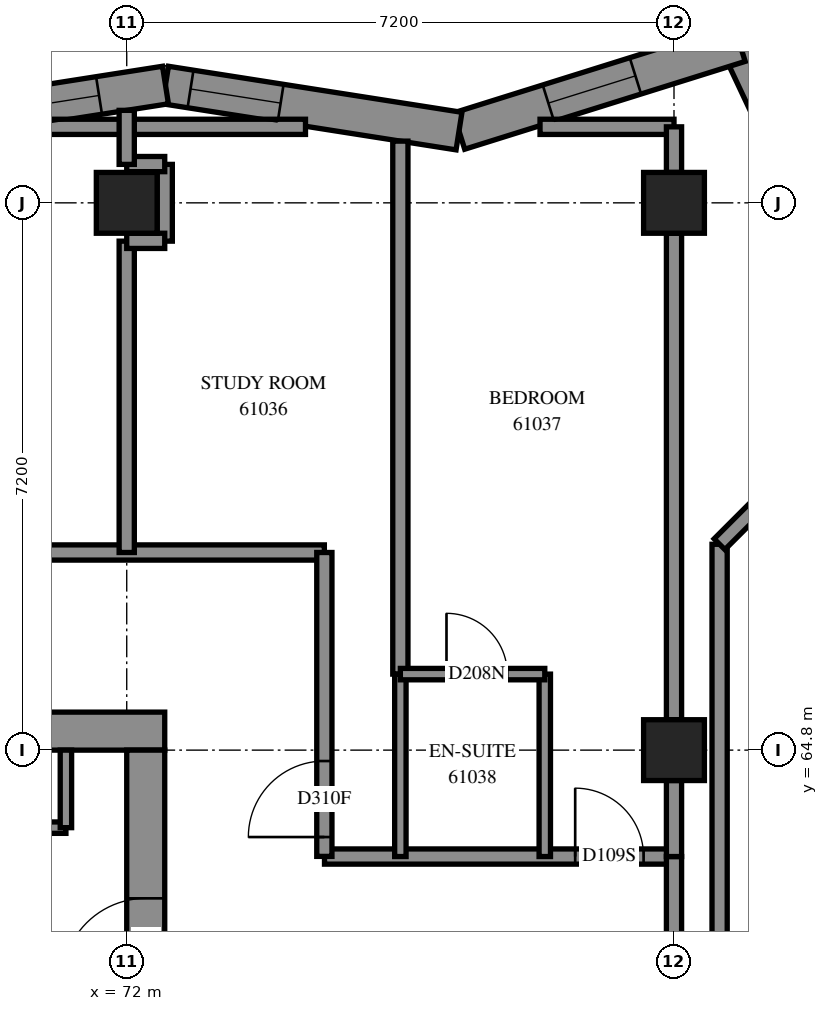
"""IFC4 building model, lengths in metres.
Left out: names, types, materials, properties, quantities, classifications, styles, units other than length and angle.
Written with IfcOpenShell. Run it as: python <this file> out.ifc"""

import sys

from ifc_helpers import new_model, si_unit, direction, frame, frame_2d, origin, origin_2d, place, context, subcontext, project, spatial, polyline, rectangle, outline, extrude, element, fill, save


model = new_model("IFC4")
c1 = context("Model", 3, precision=1e-05, world=origin(), true_north=direction((0.0, 1.0)))
c2 = subcontext(c1, "Body", "Model", "MODEL_VIEW")
j1 = project(units=[si_unit("LENGTHUNIT", "METRE"), si_unit("PLANEANGLEUNIT", "RADIAN")], contexts=[c1])
p1 = place(None, origin())
s1 = spatial("IfcSite", under=j1, at=p1, CompositionType="ELEMENT")
p2 = place(p1, origin())
s2 = spatial("IfcBuilding", under=s1, at=p2, CompositionType="ELEMENT")
p3 = place(p2, frame((0.0, 0.0, 223.6)))
s3 = spatial("IfcBuildingStorey", under=s2, at=p3, CompositionType="ELEMENT", Elevation=223.6)
for number, where, z_axis, x_axis in (
    (1, (72.0, 72.0, 0.0), (0.0, 0.0, 1.0), (1.0, 0.0, 0.0)),
    (2, (79.2, 64.8, 0.0), (0.0, 0.0, 1.0), (1.0, 0.0, 0.0)),
    (3, (79.2, 72.0, 0.0), (0.0, 0.0, 1.0), (1.0, 0.0, 0.0)),
):
    element("IfcColumn", number, at=place(p3, frame(where, z_axis=z_axis, x_axis=x_axis)), inside=s3, PredefinedType="COLUMN", context=c2, shape_type="SweptSolid", body=[
        extrude(rectangle(XDim=0.8, YDim=0.8, at=origin_2d()), origin(), (0.0, 0.0, 1.0), 3.1),
    ])
p4 = place(p3, frame((57.1, 65.05, -0.3), z_axis=(0.0, 0.0, 1.0), x_axis=(1.0, 0.0, 0.0)))
e4 = element("IfcWall", 4, at=p4, inside=s3, PredefinedType="SHEAR", context=c2, shape_type="SweptSolid", body=[
    extrude(rectangle(XDim=15.4, YDim=0.5, at=frame_2d((7.7, 0.0))), origin(), (0.0, 0.0, 1.0), 2.7),
])
p5 = place(p4, frame((10.5, 0.0, 0.3)))
e5 = element("IfcOpeningElement", 5, at=p5, cuts=e4, PredefinedType="OPENING", context=c2, shape_type="SweptSolid", body=[
    extrude(rectangle(XDim=0.8, YDim=2.1, at=frame_2d((0.4, 1.05))), frame((0.0, 0.26, 0.0), z_axis=(0.0, -1.0, 0.0), x_axis=(1.0, 0.0, 0.0)), (0.0, 0.0, 1.0), 0.52),
])
p6 = place(p3, frame((72.25, 50.4, -0.3), z_axis=(0.0, 0.0, 1.0), x_axis=(0.0, 1.0, 0.0)))
e6 = element("IfcWall", 6, at=p6, inside=s3, PredefinedType="SHEAR", context=c2, shape_type="SweptSolid", body=[
    extrude(rectangle(XDim=14.4, YDim=0.5, at=frame_2d((7.2, 0.0))), origin(), (0.0, 0.0, 1.0), 2.7),
])
p7 = place(p6, frame((4.55, 0.0, 0.3)))
e7 = element("IfcOpeningElement", 7, at=p7, cuts=e6, PredefinedType="OPENING", context=c2, shape_type="SweptSolid", body=[
    extrude(rectangle(XDim=1.1, YDim=2.1, at=frame_2d((0.55, 1.05))), frame((0.0, 0.26, 0.0), z_axis=(0.0, -1.0, 0.0), x_axis=(1.0, 0.0, 0.0)), (0.0, 0.0, 1.0), 0.52),
])
p8 = place(p6, frame((11.35, 0.0, 0.3)))
e8 = element("IfcOpeningElement", 8, at=p8, cuts=e6, PredefinedType="OPENING", context=c2, shape_type="SweptSolid", body=[
    extrude(rectangle(XDim=1.1, YDim=2.1, at=frame_2d((0.55, 1.05))), frame((0.0, 0.26, 0.0), z_axis=(0.0, -1.0, 0.0), x_axis=(1.0, 0.0, 0.0)), (0.0, 0.0, 1.0), 0.52),
])
p9 = place(p3, frame((81.508, 71.024, 0.0), z_axis=(0.0, 0.0, 1.0), x_axis=(-0.4256057347, 0.9049087018, 0.0)))
e9 = element("IfcWall", 9, at=p9, inside=s3, PredefinedType="SOLIDWALL", context=c2, shape_type="SweptSolid", body=[
    extrude(outline(polyline([(0.067, -0.25), (3.617, -0.25), (3.181, 0.25), (-0.067, 0.25), (0.067, -0.25)])), origin(), (0.0, 0.0, 1.0), 3.1),
])
p10 = place(p9, frame((0.734, 0.0, 0.45)))
e10 = element("IfcOpeningElement", 10, at=p10, cuts=e9, PredefinedType="OPENING", context=c2, shape_type="SweptSolid", body=[
    extrude(rectangle(XDim=1.2, YDim=2.5, at=frame_2d((0.6, 1.25))), frame((0.0, 0.26, 0.0), z_axis=(0.0, -1.0, 0.0), x_axis=(1.0, 0.0, 0.0)), (0.0, 0.0, 1.0), 0.52),
])
p11 = place(p3, frame((80.062, 74.099, 0.0), z_axis=(0.0, 0.0, 1.0), x_axis=(-0.9543289305, -0.2987579161, 0.0)))
e11 = element("IfcWall", 11, at=p11, inside=s3, PredefinedType="SOLIDWALL", context=c2, shape_type="SweptSolid", body=[
    extrude(outline(polyline([(-0.218, -0.25), (3.809, -0.25), (3.925, 0.25), (0.218, 0.25), (-0.218, -0.25)])), origin(), (0.0, 0.0, 1.0), 3.1),
])
p12 = place(p11, frame((1.435, 0.0, 0.45)))
e12 = element("IfcOpeningElement", 12, at=p12, cuts=e11, PredefinedType="OPENING", context=c2, shape_type="SweptSolid", body=[
    extrude(rectangle(XDim=1.2, YDim=2.5, at=frame_2d((0.6, 1.25))), frame((0.0, 0.26, 0.0), z_axis=(0.0, -1.0, 0.0), x_axis=(1.0, 0.0, 0.0)), (0.0, 0.0, 1.0), 0.52),
])
p13 = place(p3, frame((76.372, 72.944, 0.0), z_axis=(0.0, 0.0, 1.0), x_axis=(-0.9879139197, 0.1550035072, 0.0)))
e13 = element("IfcWall", 13, at=p13, inside=s3, PredefinedType="SOLIDWALL", context=c2, shape_type="SweptSolid", body=[
    extrude(outline(polyline([(0.058, -0.25), (3.948, -0.25), (3.87, 0.25), (-0.058, 0.25), (0.058, -0.25)])), origin(), (0.0, 0.0, 1.0), 3.1),
])
p14 = place(p13, frame((2.375, 0.0, 0.45)))
e14 = element("IfcOpeningElement", 14, at=p14, cuts=e13, PredefinedType="OPENING", context=c2, shape_type="SweptSolid", body=[
    extrude(rectangle(XDim=1.2, YDim=2.5, at=frame_2d((0.6, 1.25))), frame((0.0, 0.26, 0.0), z_axis=(0.0, -1.0, 0.0), x_axis=(1.0, 0.0, 0.0)), (0.0, 0.0, 1.0), 0.52),
])
p15 = place(p3, frame((72.51, 73.55, 0.0), z_axis=(0.0, 0.0, 1.0), x_axis=(-0.9879107269, -0.1550238552, 0.0)))
e15 = element("IfcWall", 15, at=p15, inside=s3, PredefinedType="SOLIDWALL", context=c2, shape_type="SweptSolid", body=[
    extrude(outline(polyline([(-0.039, -0.25), (3.85, -0.25), (3.929, 0.25), (0.039, 0.25), (-0.039, -0.25)])), origin(), (0.0, 0.0, 1.0), 3.1),
])
p16 = place(p15, frame((2.203, 0.0, 0.45)))
e16 = element("IfcOpeningElement", 16, at=p16, cuts=e15, PredefinedType="OPENING", context=c2, shape_type="SweptSolid", body=[
    extrude(rectangle(XDim=1.3, YDim=2.5, at=frame_2d((0.65, 1.25))), frame((0.0, 0.26, 0.0), z_axis=(0.0, -1.0, 0.0), x_axis=(1.0, 0.0, 0.0)), (0.0, 0.0, 1.0), 0.52),
])
p17 = place(p15, frame((0.885, 0.0, 0.45)))
e17 = element("IfcOpeningElement", 17, at=p17, cuts=e15, PredefinedType="OPENING", context=c2, shape_type="SweptSolid", body=[
    extrude(rectangle(XDim=0.8, YDim=2.5, at=frame_2d((0.4, 1.25))), frame((0.0, 0.26, 0.0), z_axis=(0.0, -1.0, 0.0), x_axis=(1.0, 0.0, 0.0)), (0.0, 0.0, 1.0), 0.52),
])
p18 = place(p3, frame((64.95, 63.78, 0.0), z_axis=(0.0, 0.0, 1.0), x_axis=(1.0, 0.0, 0.0)))
e18 = element("IfcWall", 18, at=p18, inside=s3, PredefinedType="PARTITIONING", context=c2, shape_type="SweptSolid", body=[
    extrude(rectangle(XDim=6.25, YDim=0.15, at=frame_2d((3.125, 0.0))), origin(), (0.0, 0.0, 1.0), 3.1),
])
p19 = place(p3, frame((71.2, 63.78, 0.0), z_axis=(0.0, 0.0, 1.0), x_axis=(0.0, 1.0, 0.0)))
e19 = element("IfcWall", 19, at=p19, inside=s3, PredefinedType="PARTITIONING", context=c2, shape_type="SweptSolid", body=[
    extrude(rectangle(XDim=1.02, YDim=0.15, at=frame_2d((0.51, 0.0))), origin(), (0.0, 0.0, 1.0), 3.1),
])
p20 = place(p3, frame((55.0, 67.4, 0.0), z_axis=(0.0, 0.0, 1.0), x_axis=(1.0, 0.0, 0.0)))
e20 = element("IfcWall", 20, at=p20, inside=s3, PredefinedType="PARTITIONING", context=c2, shape_type="SweptSolid", body=[
    extrude(rectangle(XDim=19.6, YDim=0.2, at=frame_2d((9.8, 0.0))), origin(), (0.0, 0.0, 1.0), 3.1),
])
p21 = place(p20, frame((4.9, 0.0, 0.0)))
e21 = element("IfcOpeningElement", 21, at=p21, cuts=e20, PredefinedType="OPENING", context=c2, shape_type="SweptSolid", body=[
    extrude(rectangle(XDim=0.9, YDim=2.1, at=frame_2d((0.45, 1.05))), frame((0.0, 0.11, 0.0), z_axis=(0.0, -1.0, 0.0), x_axis=(1.0, 0.0, 0.0)), (0.0, 0.0, 1.0), 0.22),
])
p22 = place(p20, frame((6.6, 0.0, 0.0)))
e22 = element("IfcOpeningElement", 22, at=p22, cuts=e20, PredefinedType="OPENING", context=c2, shape_type="SweptSolid", body=[
    extrude(rectangle(XDim=0.9, YDim=2.1, at=frame_2d((0.45, 1.05))), frame((0.0, 0.11, 0.0), z_axis=(0.0, -1.0, 0.0), x_axis=(1.0, 0.0, 0.0)), (0.0, 0.0, 1.0), 0.22),
])
p23 = place(p20, frame((14.001, 0.0, 0.0)))
e23 = element("IfcOpeningElement", 23, at=p23, cuts=e20, PredefinedType="OPENING", context=c2, shape_type="SweptSolid", body=[
    extrude(rectangle(XDim=0.9, YDim=2.1, at=frame_2d((0.45, 1.05))), frame((0.0, 0.11, 0.0), z_axis=(0.0, -1.0, 0.0), x_axis=(1.0, 0.0, 0.0)), (0.0, 0.0, 1.0), 0.22),
])
p24 = place(p3, frame((79.8, 55.912, 0.0), z_axis=(0.0, 0.0, 1.0), x_axis=(0.0, 1.0, 0.0)))
e24 = element("IfcWall", 24, at=p24, inside=s3, PredefinedType="PARTITIONING", context=c2, shape_type="SweptSolid", body=[
    extrude(rectangle(XDim=11.596, YDim=0.2, at=frame_2d((5.798, 0.0))), origin(), (0.0, 0.0, 1.0), 3.1),
])
p25 = place(p3, frame((79.799, 55.913, 0.0), z_axis=(0.0, 0.0, 1.0), x_axis=(0.7071067812, 0.7071067812, 0.0)))
e25 = element("IfcWall", 25, at=p25, inside=s3, PredefinedType="PARTITIONING", context=c2, shape_type="SweptSolid", body=[
    extrude(rectangle(XDim=9.95, YDim=0.2, at=frame_2d((4.975, 0.0))), origin(), (0.0, 0.0, 1.0), 3.1),
])
p26 = place(p25, frame((0.927, 0.0, 0.0)))
e26 = element("IfcOpeningElement", 26, at=p26, cuts=e25, PredefinedType="OPENING", context=c2, shape_type="SweptSolid", body=[
    extrude(rectangle(XDim=1.0, YDim=2.1, at=frame_2d((0.5, 1.05))), frame((0.0, 0.11, 0.0), z_axis=(0.0, -1.0, 0.0), x_axis=(1.0, 0.0, 0.0)), (0.0, 0.0, 1.0), 0.22),
])
p27 = place(p3, frame((75.6, 65.8, 0.0), z_axis=(0.0, 0.0, 1.0), x_axis=(0.0, 1.0, 0.0)))
e27 = element("IfcWall", 27, at=p27, inside=s3, PredefinedType="PARTITIONING", context=c2, shape_type="SweptSolid", body=[
    extrude(rectangle(XDim=7.012, YDim=0.2, at=frame_2d((3.506, 0.0))), origin(), (0.0, 0.0, 1.0), 3.1),
])
p28 = place(p3, frame((79.2, 65.2, 0.0), z_axis=(0.0, 0.0, 1.0), x_axis=(0.0, 1.0, 0.0)))
e28 = element("IfcWall", 28, at=p28, inside=s3, PredefinedType="PARTITIONING", context=c2, shape_type="SweptSolid", body=[
    extrude(rectangle(XDim=6.4, YDim=0.2, at=frame_2d((3.2, 0.0))), origin(), (0.0, 0.0, 1.0), 3.1),
])
p29 = place(p3, frame((74.602, 63.4, 0.0), z_axis=(0.0, 0.0, 1.0), x_axis=(1.0, 0.0, 0.0)))
e29 = element("IfcWall", 29, at=p29, inside=s3, PredefinedType="PARTITIONING", context=c2, shape_type="SweptSolid", body=[
    extrude(rectangle(XDim=4.598, YDim=0.2, at=frame_2d((2.299, 0.0))), origin(), (0.0, 0.0, 1.0), 3.1),
])
p30 = place(p29, frame((3.298, 0.0, 0.0)))
e30 = element("IfcOpeningElement", 30, at=p30, cuts=e29, PredefinedType="OPENING", context=c2, shape_type="SweptSolid", body=[
    extrude(rectangle(XDim=0.9, YDim=2.1, at=frame_2d((0.45, 1.05))), frame((0.0, 0.11, 0.0), z_axis=(0.0, -1.0, 0.0), x_axis=(1.0, 0.0, 0.0)), (0.0, 0.0, 1.0), 0.22),
])
p31 = place(p3, frame((72.0, 67.4, 0.0), z_axis=(0.0, 0.0, 1.0), x_axis=(0.0, 1.0, 0.0)))
e31 = element("IfcWall", 31, at=p31, inside=s3, PredefinedType="PARTITIONING", context=c2, shape_type="SweptSolid", body=[
    extrude(rectangle(XDim=4.096, YDim=0.2, at=frame_2d((2.048, 0.0))), origin(), (0.0, 0.0, 1.0), 3.1),
])
p32 = place(p3, frame((74.6, 63.402, 0.0), z_axis=(0.0, 0.0, 1.0), x_axis=(0.0, 1.0, 0.0)))
e32 = element("IfcWall", 32, at=p32, inside=s3, PredefinedType="PARTITIONING", context=c2, shape_type="SweptSolid", body=[
    extrude(rectangle(XDim=3.998, YDim=0.2, at=frame_2d((1.999, 0.0))), origin(), (0.0, 0.0, 1.0), 3.1),
])
p33 = place(p32, frame((0.255, 0.0, 0.0)))
e33 = element("IfcOpeningElement", 33, at=p33, cuts=e32, PredefinedType="OPENING", context=c2, shape_type="SweptSolid", body=[
    extrude(rectangle(XDim=1.0, YDim=2.1, at=frame_2d((0.5, 1.05))), frame((0.0, 0.11, 0.0), z_axis=(0.0, -1.0, 0.0), x_axis=(1.0, 0.0, 0.0)), (0.0, 0.0, 1.0), 0.22),
])
p34 = place(p3, frame((70.668, 73.0, 0.0), z_axis=(0.0, 0.0, 1.0), x_axis=(1.0, 0.0, 0.0)))
e34 = element("IfcWall", 34, at=p34, inside=s3, PredefinedType="PARTITIONING", context=c2, shape_type="SweptSolid", body=[
    extrude(rectangle(XDim=3.684, YDim=0.2, at=frame_2d((1.842, 0.0))), origin(), (0.0, 0.0, 1.0), 3.1),
])
p35 = place(p3, frame((79.799, 67.509, 0.0), z_axis=(0.0, 0.0, 1.0), x_axis=(0.707093159, 0.7071204031, 0.0)))
e35 = element("IfcWall", 35, at=p35, inside=s3, PredefinedType="PARTITIONING", context=c2, shape_type="SweptSolid", body=[
    extrude(rectangle(XDim=3.671, YDim=0.2, at=frame_2d((1.835, 0.0))), origin(), (0.0, 0.0, 1.0), 3.1),
])
for number, where, z_axis, x_axis in (
    (36, (75.6, 63.4, 0.0), (0.0, 0.0, 1.0), (0.0, 1.0, 0.0)),
    (37, (77.5, 63.4, 0.0), (0.0, 0.0, 1.0), (0.0, 1.0, 0.0)),
):
    element("IfcWall", number, at=place(p3, frame(where, z_axis=z_axis, x_axis=x_axis)), inside=s3, PredefinedType="PARTITIONING", context=c2, shape_type="SweptSolid", body=[
        extrude(rectangle(XDim=2.4, YDim=0.15, at=frame_2d((1.2, 0.0))), origin(), (0.0, 0.0, 1.0), 3.1),
    ])
p36 = place(p3, frame((79.2, 61.4, 0.0), z_axis=(0.0, 0.0, 1.0), x_axis=(0.0, 1.0, 0.0)))
e38 = element("IfcWall", 38, at=p36, inside=s3, PredefinedType="PARTITIONING", context=c2, shape_type="SweptSolid", body=[
    extrude(rectangle(XDim=2.0, YDim=0.2, at=frame_2d((1.0, 0.0))), origin(), (0.0, 0.0, 1.0), 3.1),
])
p37 = place(p3, frame((75.6, 65.8, 0.0), z_axis=(0.0, 0.0, 1.0), x_axis=(1.0, 0.0, 0.0)))
e39 = element("IfcWall", 39, at=p37, inside=s3, PredefinedType="PARTITIONING", context=c2, shape_type="SweptSolid", body=[
    extrude(rectangle(XDim=1.9, YDim=0.15, at=frame_2d((0.95, 0.0))), origin(), (0.0, 0.0, 1.0), 3.1),
])
p38 = place(p37, frame((0.607, 0.0, 0.0)))
e40 = element("IfcOpeningElement", 40, at=p38, cuts=e39, PredefinedType="OPENING", context=c2, shape_type="SweptSolid", body=[
    extrude(rectangle(XDim=0.8, YDim=2.1, at=frame_2d((0.4, 1.05))), frame((0.0, 0.085, 0.0), z_axis=(0.0, -1.0, 0.0), x_axis=(1.0, 0.0, 0.0)), (0.0, 0.0, 1.0), 0.17),
])
p39 = place(p3, frame((77.437, 73.0, 0.0), z_axis=(0.0, 0.0, 1.0), x_axis=(1.0, 0.0, 0.0)))
e41 = element("IfcWall", 41, at=p39, inside=s3, PredefinedType="PARTITIONING", context=c2, shape_type="SweptSolid", body=[
    extrude(rectangle(XDim=1.763, YDim=0.2, at=frame_2d((0.881, 0.0))), origin(), (0.0, 0.0, 1.0), 3.1),
])
p40 = place(p3, frame((72.5, 71.496, 0.0), z_axis=(0.0, 0.0, 1.0), x_axis=(0.0, 1.0, 0.0)))
e42 = element("IfcWall", 42, at=p40, inside=s3, PredefinedType="PARTITIONING", context=c2, shape_type="SweptSolid", body=[
    extrude(rectangle(XDim=1.01, YDim=0.2, at=frame_2d((0.505, 0.0))), origin(), (0.0, 0.0, 1.0), 3.1),
])
p41 = place(p3, frame((79.2, 63.4, 0.0), z_axis=(0.0, 0.0, 1.0), x_axis=(0.0, 1.0, 0.0)))
e43 = element("IfcWall", 43, at=p41, inside=s3, PredefinedType="PARTITIONING", context=c2, shape_type="SweptSolid", body=[
    extrude(rectangle(XDim=1.0, YDim=0.2, at=frame_2d((0.5, 0.0))), origin(), (0.0, 0.0, 1.0), 3.1),
])
p42 = place(p3, frame((79.2, 72.4, 0.0), z_axis=(0.0, 0.0, 1.0), x_axis=(0.0, 1.0, 0.0)))
e44 = element("IfcWall", 44, at=p42, inside=s3, PredefinedType="PARTITIONING", context=c2, shape_type="SweptSolid", body=[
    extrude(rectangle(XDim=0.6, YDim=0.2, at=frame_2d((0.3, 0.0))), origin(), (0.0, 0.0, 1.0), 3.1),
])
for number, where, z_axis, x_axis in (
    (45, (72.0, 71.5, 0.0), (0.0, 0.0, 1.0), (1.0, 0.0, 0.0)),
    (46, (72.0, 72.51, 0.0), (0.0, 0.0, 1.0), (1.0, 0.0, 0.0)),
):
    element("IfcWall", number, at=place(p3, frame(where, z_axis=z_axis, x_axis=x_axis)), inside=s3, PredefinedType="PARTITIONING", context=c2, shape_type="SweptSolid", body=[
        extrude(rectangle(XDim=0.5, YDim=0.2, at=frame_2d((0.25, 0.0))), origin(), (0.0, 0.0, 1.0), 3.1),
    ])
p43 = place(p3, frame((72.0, 72.506, 0.0), z_axis=(0.0, 0.0, 1.0), x_axis=(0.0, 1.0, 0.0)))
e47 = element("IfcWall", 47, at=p43, inside=s3, PredefinedType="PARTITIONING", context=c2, shape_type="SweptSolid", body=[
    extrude(rectangle(XDim=0.711, YDim=0.2, at=frame_2d((0.355, 0.0))), origin(), (0.0, 0.0, 1.0), 3.1),
])
p44 = place(p12, origin())
e48 = element("IfcWindow", 48, at=p44, inside=s3, PartitioningType="SINGLE_PANEL", PredefinedType="WINDOW", context=c2, shape_type="SweptSolid", body=[
    extrude(rectangle(XDim=1.2, YDim=2.5, at=frame_2d((0.6, 1.25))), frame((0.0, 0.18, 0.0), z_axis=(0.0, -1.0, 0.0), x_axis=(1.0, 0.0, 0.0)), (0.0, 0.0, 1.0), 0.06),
])
fill(e12, e48)
p45 = place(p14, origin())
e49 = element("IfcWindow", 49, at=p45, inside=s3, PartitioningType="SINGLE_PANEL", PredefinedType="WINDOW", context=c2, shape_type="SweptSolid", body=[
    extrude(rectangle(XDim=1.2, YDim=2.5, at=frame_2d((0.6, 1.25))), frame((0.0, 0.18, 0.0), z_axis=(0.0, -1.0, 0.0), x_axis=(1.0, 0.0, 0.0)), (0.0, 0.0, 1.0), 0.06),
])
fill(e14, e49)
p46 = place(p8, origin())
e50 = element("IfcDoor", 50, at=p46, inside=s3, OperationType="SINGLE_SWING_RIGHT", PredefinedType="DOOR", context=c2, shape_type="SweptSolid", body=[
    extrude(rectangle(XDim=1.1, YDim=2.1, at=frame_2d((0.55, 1.05))), frame((0.0, 0.025, 0.0), z_axis=(0.0, -1.0, 0.0), x_axis=(1.0, 0.0, 0.0)), (0.0, 0.0, 1.0), 0.05),
])
fill(e8, e50)
p47 = place(p33, origin())
e51 = element("IfcDoor", 51, at=p47, inside=s3, OperationType="SINGLE_SWING_RIGHT", PredefinedType="DOOR", context=c2, shape_type="SweptSolid", body=[
    extrude(rectangle(XDim=1.0, YDim=2.1, at=frame_2d((0.5, 1.05))), frame((0.0, 0.025, 0.0), z_axis=(0.0, -1.0, 0.0), x_axis=(1.0, 0.0, 0.0)), (0.0, 0.0, 1.0), 0.05),
])
fill(e33, e51)
p48 = place(p30, origin())
e52 = element("IfcDoor", 52, at=p48, inside=s3, OperationType="SINGLE_SWING_LEFT", PredefinedType="DOOR", context=c2, shape_type="SweptSolid", body=[
    extrude(rectangle(XDim=0.9, YDim=2.1, at=frame_2d((0.45, 1.05))), frame((0.0, 0.025, 0.0), z_axis=(0.0, -1.0, 0.0), x_axis=(1.0, 0.0, 0.0)), (0.0, 0.0, 1.0), 0.05),
])
fill(e30, e52)
p49 = place(p38, origin())
e53 = element("IfcDoor", 53, at=p49, inside=s3, OperationType="SINGLE_SWING_RIGHT", PredefinedType="DOOR", context=c2, shape_type="SweptSolid", body=[
    extrude(rectangle(XDim=0.8, YDim=2.1, at=frame_2d((0.4, 1.05))), frame((0.0, 0.025, 0.0), z_axis=(0.0, -1.0, 0.0), x_axis=(1.0, 0.0, 0.0)), (0.0, 0.0, 1.0), 0.05),
])
fill(e40, e53)
p50 = place(p17, origin())
e54 = element("IfcWindow", 54, at=p50, inside=s3, PartitioningType="SINGLE_PANEL", PredefinedType="WINDOW", context=c2, shape_type="SweptSolid", body=[
    extrude(rectangle(XDim=0.8, YDim=2.5, at=frame_2d((0.4, 1.25))), frame((0.0, 0.12, 0.0), z_axis=(0.0, -1.0, 0.0), x_axis=(1.0, 0.0, 0.0)), (0.0, 0.0, 1.0), 0.06),
])
fill(e17, e54)
save(model, sys.argv[1])
